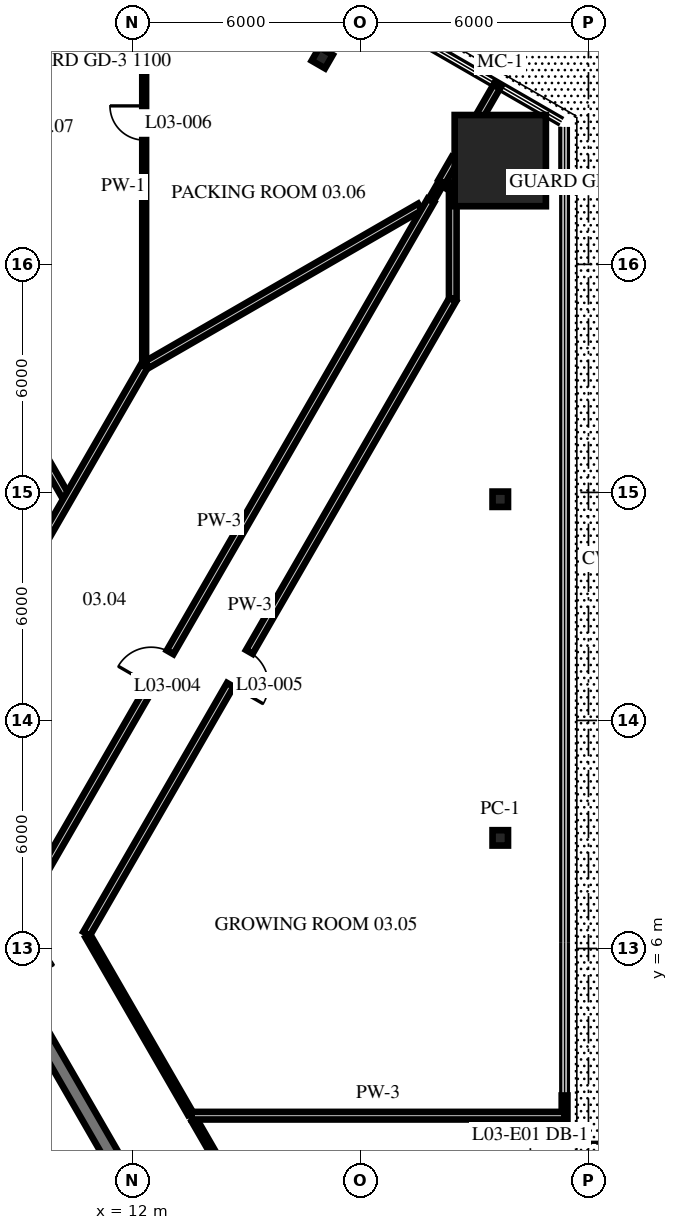
"""IFC4 building model, lengths in metres.
Left out: names, types, materials, properties, quantities, classifications, styles, units other than length and angle.
Written with IfcOpenShell. Run it as: python <this file> out.ifc"""

import sys

from ifc_helpers import new_model, si_unit, direction, frame, frame_2d, origin, origin_2d, place, context, subcontext, project, spatial, polyline, rectangle, i_section, outline, extrude, source, transform, mapped, element, fill, save


model = new_model("IFC4")
c1 = context("Model", 3, precision=1e-05, world=origin(), true_north=direction((0.0, 1.0)))
c2 = subcontext(c1, "Body", "Model", "MODEL_VIEW")
j1 = project(units=[si_unit("LENGTHUNIT", "METRE"), si_unit("PLANEANGLEUNIT", "RADIAN")], contexts=[c1])
p1 = place(None, origin())
s1 = spatial("IfcSite", under=j1, at=p1, CompositionType="ELEMENT")
p2 = place(p1, origin())
s2 = spatial("IfcBuilding", under=s1, at=p2, CompositionType="ELEMENT")
p3 = place(p2, frame((0.0, 0.0, 16.0)))
s3 = spatial("IfcBuildingStorey", under=s2, at=p3, CompositionType="ELEMENT", Elevation=16.0)
m1 = source(origin(), c2, "Body", "SweptSolid", [
    extrude(i_section(OverallWidth=0.404, OverallDepth=0.406, WebThickness=0.027, FlangeThickness=0.044, at=origin_2d()), origin(), (0.0, 0.0, 1.0), 4.3),
])
for number, where, z_axis, x_axis in (
    (1, (21.679, 8.91, 0.0), (0.0, 0.0, 1.0), (0.0, 1.0, 0.0)),
    (2, (21.679, 17.82, 0.0), (0.0, 0.0, 1.0), (0.0, 1.0, 0.0)),
):
    element("IfcColumn", number, at=place(p3, frame(where, z_axis=z_axis, x_axis=x_axis)), inside=s3, PredefinedType="COLUMN", context=c2, shape_type="MappedRepresentation", body=[
        mapped(m1, transform((0.0, 0.0, 0.0), scale=1.0)),
    ])
m2 = source(origin(), c2, "Body", "SweptSolid", [
    extrude(rectangle(XDim=2.4, YDim=2.4, at=origin_2d()), origin(), (0.0, 0.0, 1.0), 4.3),
])
p4 = place(p3, frame((21.679, 26.73, 0.0), z_axis=(0.0, 0.0, 1.0), x_axis=(0.0, 1.0, 0.0)))
e3 = element("IfcColumn", 3, at=p4, inside=s3, PredefinedType="COLUMN", context=c2, shape_type="MappedRepresentation", body=[
    mapped(m2, transform((0.0, 0.0, 0.0), scale=1.0)),
])
p5 = place(p3, frame((16.994, 29.435, 0.0), z_axis=(0.0, 0.0, 1.0), x_axis=(-0.866026276448, 0.4999984885, 0.0)))
e4 = element("IfcColumn", 4, at=p5, inside=s3, PredefinedType="COLUMN", context=c2, shape_type="MappedRepresentation", body=[
    mapped(m1, transform((0.0, 0.0, 0.0), scale=1.0)),
])
m3 = source(origin(), c2, "Body", "SweptSolid", [
    extrude(outline(polyline([(-0.115, -0.2), (11.885, -0.2), (11.654, 0.2), (0.115, 0.2), (-0.115, -0.2)])), origin(), (0.0, 0.0, 1.0), 4.1),
])
p6 = place(p3, frame((11.769, 0.0, 0.0), z_axis=(0.0, 0.0, 1.0), x_axis=(-0.499996592174, 0.866027371285, 0.0)))
e5 = element("IfcWall", 5, at=p6, inside=s3, PredefinedType="SHEAR", context=c2, shape_type="MappedRepresentation", body=[
    mapped(m3, transform((0.0, 0.0, 0.0), scale=1.0)),
])
p7 = place(p6, frame((5.75, 0.0, 0.0)))
e6 = element("IfcOpeningElement", 6, at=p7, cuts=e5, PredefinedType="OPENING", context=c2, shape_type="SweptSolid", body=[
    extrude(rectangle(XDim=1.2, YDim=2.1, at=frame_2d((0.6, 1.05))), frame((0.0, 0.21, 0.0), z_axis=(0.0, -1.0, 0.0), x_axis=(1.0, 0.0, 0.0)), (0.0, 0.0, 1.0), 0.42),
])
m4 = source(origin(), c2, "Body", "SweptSolid", [
    extrude(rectangle(XDim=4.263, YDim=0.15, at=frame_2d((2.131, 0.0))), origin(), (0.0, 0.0, 1.0), 4.1),
])
p8 = place(p3, frame((23.371, 2.131, 0.0), z_axis=(0.0, 0.0, 1.0), x_axis=(0.0, -1.0, 0.0)))
e7 = element("IfcWall", 7, at=p8, inside=s3, PredefinedType="ELEMENTEDWALL", context=c2, shape_type="MappedRepresentation", body=[
    mapped(m4, transform((0.0, 0.0, 0.0), scale=1.0)),
])
p9 = place(p8, frame((1.231, 0.0, 0.0)))
e8 = element("IfcOpeningElement", 8, at=p9, cuts=e7, PredefinedType="OPENING", context=c2, shape_type="SweptSolid", body=[
    extrude(rectangle(XDim=1.8, YDim=2.4, at=frame_2d((0.9, 1.2))), frame((0.0, 0.085, 0.0), z_axis=(0.0, -1.0, 0.0), x_axis=(1.0, 0.0, 0.0)), (0.0, 0.0, 1.0), 0.17),
])
p10 = place(p3, frame((10.83, 6.327, 0.0), z_axis=(0.0, 0.0, 1.0), x_axis=(0.500005980693, -0.866021950802, 0.0)))
e9 = element("IfcWall", 9, at=p10, inside=s3, PredefinedType="PARTITIONING", context=c2, shape_type="SweptSolid", body=[
    extrude(rectangle(XDim=5.392, YDim=0.15, at=frame_2d((2.696, 0.0))), origin(), (0.0, 0.0, 1.0), 4.1),
])
p11 = place(p3, frame((13.625, 1.484, 0.0), z_axis=(0.0, 0.0, 1.0), x_axis=(0.500075917473, -0.865981568374, 0.0)))
e10 = element("IfcWall", 10, at=p11, inside=s3, PredefinedType="PARTITIONING", context=c2, shape_type="SweptSolid", body=[
    extrude(rectangle(XDim=1.674, YDim=0.15, at=frame_2d((0.837, 0.0))), origin(), (0.0, 0.0, 1.0), 4.1),
])
p12 = place(p3, frame((8.474, 20.963, 0.0), z_axis=(0.0, 0.0, 1.0), x_axis=(0.500009718699, -0.866019792618, 0.0)))
e11 = element("IfcWall", 11, at=p12, inside=s3, PredefinedType="PARTITIONING", context=c2, shape_type="SweptSolid", body=[
    extrude(rectangle(XDim=3.629, YDim=0.2, at=frame_2d((1.815, 0.0))), origin(), (0.0, 0.0, 1.0), 4.1),
])
p13 = place(p3, frame((20.21, 26.135, 0.0), z_axis=(0.0, 0.0, 1.0), x_axis=(0.865608577882, -0.500721269667, 0.0)))
e12 = element("IfcWall", 12, at=p13, inside=s3, PredefinedType="PARTITIONING", context=c2, shape_type="SweptSolid", body=[
    extrude(rectangle(XDim=0.183, YDim=0.2, at=frame_2d((0.092, 0.0))), origin(), (0.0, 0.0, 1.0), 4.1),
])
p14 = place(p3, frame((13.559, 1.6, 0.0), z_axis=(0.0, 0.0, 1.0), x_axis=(1.0, 0.0, 0.0)))
e13 = element("IfcWall", 13, at=p14, inside=s3, PredefinedType="PARTITIONING", context=c2, shape_type="SweptSolid", body=[
    extrude(rectangle(XDim=9.812, YDim=0.2, at=frame_2d((4.906, 0.0))), origin(), (0.0, 0.0, 1.0), 4.1),
])
p15 = place(p3, frame((12.387, 21.365, 0.0), z_axis=(0.0, 0.0, 1.0), x_axis=(0.866019818373, 0.500009674092, 0.0)))
e14 = element("IfcWall", 14, at=p15, inside=s3, PredefinedType="PARTITIONING", context=c2, shape_type="SweptSolid", body=[
    extrude(rectangle(XDim=8.29, YDim=0.2, at=frame_2d((4.145, 0.0))), origin(), (0.0, 0.0, 1.0), 4.1),
])
p16 = place(p3, frame((10.795, 6.387, 0.0), z_axis=(0.0, 0.0, 1.0), x_axis=(0.499994080432, 0.866028821422, 0.0)))
e15 = element("IfcWall", 15, at=p16, inside=s3, PredefinedType="PARTITIONING", context=c2, shape_type="SweptSolid", body=[
    extrude(rectangle(XDim=19.269, YDim=0.2, at=frame_2d((9.635, 0.0))), origin(), (0.0, 0.0, 1.0), 4.1),
])
p17 = place(p16, frame((7.563, 0.0, 0.0)))
e16 = element("IfcOpeningElement", 16, at=p17, cuts=e15, PredefinedType="OPENING", context=c2, shape_type="SweptSolid", body=[
    extrude(rectangle(XDim=1.0, YDim=2.1, at=frame_2d((0.5, 1.05))), frame((0.0, 0.11, 0.0), z_axis=(0.0, -1.0, 0.0), x_axis=(1.0, 0.0, 0.0)), (0.0, 0.0, 1.0), 0.22),
])
p18 = place(p3, frame((9.755, 8.188, 0.0), z_axis=(0.0, 0.0, 1.0), x_axis=(0.500007734453, 0.86602093825, 0.0)))
e17 = element("IfcWall", 17, at=p18, inside=s3, PredefinedType="PARTITIONING", context=c2, shape_type="SweptSolid", body=[
    extrude(rectangle(XDim=20.199, YDim=0.2, at=frame_2d((10.1, 0.0))), origin(), (0.0, 0.0, 1.0), 4.1),
])
p19 = place(p18, frame((5.473, 0.0, 0.0)))
e18 = element("IfcOpeningElement", 18, at=p19, cuts=e17, PredefinedType="OPENING", context=c2, shape_type="SweptSolid", body=[
    extrude(rectangle(XDim=1.0, YDim=2.1, at=frame_2d((0.5, 1.05))), frame((0.0, 0.11, 0.0), z_axis=(0.0, -1.0, 0.0), x_axis=(1.0, 0.0, 0.0)), (0.0, 0.0, 1.0), 0.22),
])
p20 = place(p3, frame((19.855, 25.68, 0.0), z_axis=(0.0, 0.0, 1.0), x_axis=(0.500427620203, 0.86577837634, 0.0)))
e19 = element("IfcWall", 19, at=p20, inside=s3, PredefinedType="PARTITIONING", context=c2, shape_type="SweptSolid", body=[
    extrude(rectangle(XDim=0.569, YDim=0.15, at=frame_2d((0.285, 0.0))), origin(), (0.0, 0.0, 1.0), 4.1),
])
p21 = place(p3, frame((20.14, 26.173, 0.0), z_axis=(0.0, 0.0, 1.0), x_axis=(0.49989369433, 0.866086770693, 0.0)))
e20 = element("IfcWall", 20, at=p21, inside=s3, PredefinedType="PARTITIONING", context=c2, shape_type="SweptSolid", body=[
    extrude(rectangle(XDim=0.699, YDim=0.2, at=frame_2d((0.35, 0.0))), origin(), (0.0, 0.0, 1.0), 4.1),
])
p22 = place(p3, frame((21.148, 27.92, 0.0), z_axis=(0.0, 0.0, 1.0), x_axis=(0.499935264145, 0.866062775822, 0.0)))
e21 = element("IfcWall", 21, at=p22, inside=s3, PredefinedType="PARTITIONING", context=c2, shape_type="SweptSolid", body=[
    extrude(rectangle(XDim=0.927, YDim=0.2, at=frame_2d((0.463, 0.0))), origin(), (0.0, 0.0, 1.0), 4.1),
])
p23 = place(p3, frame((7.241, 12.542, 0.0), z_axis=(0.0, 0.0, 1.0), x_axis=(0.49999906822, 0.866025941747, 0.0)))
e22 = element("IfcWall", 22, at=p23, inside=s3, PredefinedType="PARTITIONING", context=c2, shape_type="SweptSolid", body=[
    extrude(rectangle(XDim=10.136, YDim=0.2, at=frame_2d((5.068, 0.0))), origin(), (0.0, 0.0, 1.0), 4.1),
])
p24 = place(p3, frame((20.429, 23.105, 0.0), z_axis=(0.0, 0.0, 1.0), x_axis=(0.0, 1.0, 0.0)))
e23 = element("IfcWall", 23, at=p24, inside=s3, PredefinedType="PARTITIONING", context=c2, shape_type="SweptSolid", body=[
    extrude(rectangle(XDim=2.903, YDim=0.2, at=frame_2d((1.452, 0.0))), origin(), (0.0, 0.0, 1.0), 4.1),
])
p25 = place(p3, frame((12.309, 21.33, 0.0), z_axis=(0.0, 0.0, 1.0), x_axis=(0.0, 1.0, 0.0)))
e24 = element("IfcWall", 24, at=p25, inside=s3, PredefinedType="PARTITIONING", context=c2, shape_type="SweptSolid", body=[
    extrude(rectangle(XDim=9.436, YDim=0.1, at=frame_2d((4.718, 0.0))), origin(), (0.0, 0.0, 1.0), 4.1),
])
p26 = place(p25, frame((5.94, 0.0, 0.0)))
e25 = element("IfcOpeningElement", 25, at=p26, cuts=e24, PredefinedType="OPENING", context=c2, shape_type="SweptSolid", body=[
    extrude(rectangle(XDim=0.9, YDim=2.1, at=frame_2d((0.45, 1.05))), frame((0.0, 0.06, 0.0), z_axis=(0.0, -1.0, 0.0), x_axis=(1.0, 0.0, 0.0)), (0.0, 0.0, 1.0), 0.12),
])
p27 = place(p9, origin())
e26 = element("IfcDoor", 26, at=p27, inside=s3, OperationType="DOUBLE_DOOR_SINGLE_SWING", PredefinedType="DOOR", context=c2, shape_type="SweptSolid", body=[
    extrude(rectangle(XDim=1.8, YDim=2.4, at=frame_2d((0.9, 1.2))), frame((0.0, 0.025, 0.0), z_axis=(0.0, -1.0, 0.0), x_axis=(1.0, 0.0, 0.0)), (0.0, 0.0, 1.0), 0.05),
])
fill(e8, e26)
p28 = place(p19, origin())
e27 = element("IfcDoor", 27, at=p28, inside=s3, OperationType="SINGLE_SWING_LEFT", PredefinedType="DOOR", context=c2, shape_type="SweptSolid", body=[
    extrude(rectangle(XDim=1.0, YDim=2.1, at=frame_2d((0.5, 1.05))), frame((0.0, 0.025, 0.0), z_axis=(0.0, -1.0, 0.0), x_axis=(1.0, 0.0, 0.0)), (0.0, 0.0, 1.0), 0.05),
])
fill(e18, e27)
p29 = place(p17, origin())
e28 = element("IfcDoor", 28, at=p29, inside=s3, OperationType="SINGLE_SWING_RIGHT", PredefinedType="DOOR", context=c2, shape_type="SweptSolid", body=[
    extrude(rectangle(XDim=1.0, YDim=2.1, at=frame_2d((0.5, 1.05))), frame((0.0, 0.025, 0.0), z_axis=(0.0, -1.0, 0.0), x_axis=(1.0, 0.0, 0.0)), (0.0, 0.0, 1.0), 0.05),
])
fill(e16, e28)
p30 = place(p26, origin())
e29 = element("IfcDoor", 29, at=p30, inside=s3, OperationType="SINGLE_SWING_LEFT", PredefinedType="DOOR", context=c2, shape_type="SweptSolid", body=[
    extrude(rectangle(XDim=0.9, YDim=2.1, at=frame_2d((0.45, 1.05))), frame((0.0, 0.025, 0.0), z_axis=(0.0, -1.0, 0.0), x_axis=(1.0, 0.0, 0.0)), (0.0, 0.0, 1.0), 0.05),
])
fill(e25, e29)
save(model, sys.argv[1])
